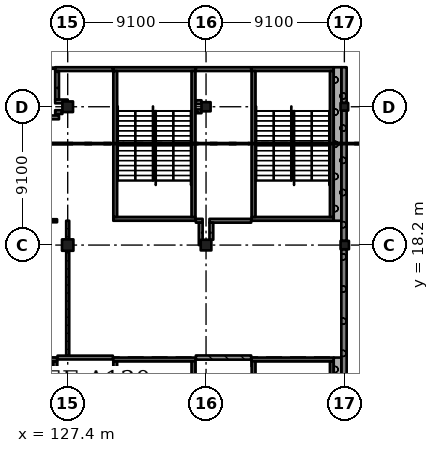
"""IFC4 building model, lengths in metres.
Left out: names, types, materials, properties, quantities, classifications, styles, units other than length and angle.
Written with IfcOpenShell. Run it as: python <this file> out.ifc"""

import sys

from ifc_helpers import new_model, si_unit, direction, frame, frame_2d, origin, origin_2d, place, context, subcontext, project, spatial, rectangle, extrude, element, fill, save


model = new_model("IFC4")
c1 = context("Model", 3, precision=1e-05, world=origin(), true_north=direction((0.0, 1.0)))
c2 = subcontext(c1, "Body", "Model", "MODEL_VIEW")
j1 = project(units=[si_unit("LENGTHUNIT", "METRE"), si_unit("PLANEANGLEUNIT", "RADIAN")], contexts=[c1])
p1 = place(None, origin())
s1 = spatial("IfcSite", under=j1, at=p1, CompositionType="ELEMENT")
p2 = place(p1, origin())
s2 = spatial("IfcBuilding", under=s1, at=p2, CompositionType="ELEMENT")
p3 = place(p2, frame((0.0, 0.0, 10.92)))
s3 = spatial("IfcBuildingStorey", under=s2, at=p3, CompositionType="ELEMENT", Elevation=10.92)
p4 = place(p3, frame((127.4, 18.2, 0.0), z_axis=(0.0, 0.0, 1.0), x_axis=(1.0, 0.0, 0.0)))
e1 = element("IfcColumn", 1, at=p4, inside=s3, PredefinedType="COLUMN", context=c2, shape_type="SweptSolid", body=[
    extrude(rectangle(XDim=0.75, YDim=0.75, at=origin_2d()), origin(), (0.0, 0.0, 1.0), 4.55),
])
for number, where, z_axis, x_axis in (
    (2, (127.4, 27.3, 0.0), (0.0, 0.0, 1.0), (1.0, 0.0, 0.0)),
    (3, (136.5, 18.2, 0.0), (0.0, 0.0, 1.0), (1.0, 0.0, 0.0)),
):
    element("IfcColumn", number, at=place(p3, frame(where, z_axis=z_axis, x_axis=x_axis)), inside=s3, PredefinedType="COLUMN", context=c2, shape_type="SweptSolid", body=[
        extrude(rectangle(XDim=0.7, YDim=0.7, at=origin_2d()), origin(), (0.0, 0.0, 1.0), 4.55),
    ])
p5 = place(p3, frame((136.5, 27.3, 0.0), z_axis=(0.0, 0.0, 1.0), x_axis=(1.0, 0.0, 0.0)))
e4 = element("IfcColumn", 4, at=p5, inside=s3, PredefinedType="COLUMN", context=c2, shape_type="SweptSolid", body=[
    extrude(rectangle(XDim=0.6, YDim=0.6, at=origin_2d()), origin(), (0.0, 0.0, 1.0), 4.55),
])
p6 = place(p3, frame((145.625, 18.2, 0.0), z_axis=(0.0, 0.0, 1.0), x_axis=(1.0, 0.0, 0.0)))
e5 = element("IfcColumn", 5, at=p6, inside=s3, PredefinedType="COLUMN", context=c2, shape_type="SweptSolid", body=[
    extrude(rectangle(XDim=0.55, YDim=0.55, at=origin_2d()), origin(), (0.0, 0.0, 1.0), 4.55),
])
p7 = place(p3, frame((145.6, 27.3, 0.0), z_axis=(0.0, 0.0, 1.0), x_axis=(1.0, 0.0, 0.0)))
e6 = element("IfcColumn", 6, at=p7, inside=s3, PredefinedType="COLUMN", context=c2, shape_type="SweptSolid", body=[
    extrude(rectangle(XDim=0.5, YDim=0.5, at=origin_2d()), origin(), (0.0, 0.0, 1.0), 4.55),
])
p8 = place(p3, frame((144.9, 10.675, 0.0), z_axis=(0.0, 0.0, 1.0), x_axis=(-1.0, 0.0, 0.0)))
e7 = element("IfcWall", 7, at=p8, inside=s3, PredefinedType="SHEAR", context=c2, shape_type="SweptSolid", body=[
    extrude(rectangle(XDim=5.4, YDim=0.25, at=frame_2d((2.7, 0.0))), origin(), (0.0, 0.0, 1.0), 4.55),
])
p9 = place(p8, frame((1.5, 0.0, 0.0)))
e8 = element("IfcOpeningElement", 8, at=p9, cuts=e7, PredefinedType="OPENING", context=c2, shape_type="SweptSolid", body=[
    extrude(rectangle(XDim=2.4, YDim=2.1, at=frame_2d((1.2, 1.05))), frame((0.0, 0.135, 0.0), z_axis=(0.0, -1.0, 0.0), x_axis=(1.0, 0.0, 0.0)), (0.0, 0.0, 1.0), 0.27),
])
for number, where, z_axis, x_axis in (
    (9, (139.625, 10.55, 0.0), (0.0, 0.0, 1.0), (0.0, -1.0, 0.0)),
    (10, (144.775, 10.55, 0.0), (0.0, 0.0, 1.0), (0.0, -1.0, 0.0)),
):
    element("IfcWall", number, at=place(p3, frame(where, z_axis=z_axis, x_axis=x_axis)), inside=s3, PredefinedType="SHEAR", context=c2, shape_type="SweptSolid", body=[
        extrude(rectangle(XDim=9.6, YDim=0.25, at=frame_2d((4.8, 0.0))), origin(), (0.0, 0.0, 1.0), 4.55),
    ])
p10 = place(p3, frame((135.8, 10.675, 0.0), z_axis=(0.0, 0.0, 1.0), x_axis=(-1.0, 0.0, 0.0)))
e11 = element("IfcWall", 11, at=p10, inside=s3, PredefinedType="SHEAR", context=c2, shape_type="SweptSolid", body=[
    extrude(rectangle(XDim=5.4, YDim=0.25, at=frame_2d((2.7, 0.0))), origin(), (0.0, 0.0, 1.0), 4.55),
])
p11 = place(p10, frame((1.5, 0.0, 0.0)))
e12 = element("IfcOpeningElement", 12, at=p11, cuts=e11, PredefinedType="OPENING", context=c2, shape_type="SweptSolid", body=[
    extrude(rectangle(XDim=2.4, YDim=2.1, at=frame_2d((1.2, 1.05))), frame((0.0, 0.135, 0.0), z_axis=(0.0, -1.0, 0.0), x_axis=(1.0, 0.0, 0.0)), (0.0, 0.0, 1.0), 0.27),
])
for number, where, z_axis, x_axis in (
    (13, (130.525, 10.55, 0.0), (0.0, 0.0, 1.0), (0.0, -1.0, 0.0)),
    (14, (135.675, 10.55, 0.0), (0.0, 0.0, 1.0), (0.0, -1.0, 0.0)),
):
    element("IfcWall", number, at=place(p3, frame(where, z_axis=z_axis, x_axis=x_axis)), inside=s3, PredefinedType="SHEAR", context=c2, shape_type="SweptSolid", body=[
        extrude(rectangle(XDim=9.6, YDim=0.25, at=frame_2d((4.8, 0.0))), origin(), (0.0, 0.0, 1.0), 4.55),
    ])
p12 = place(p3, frame((126.7, 10.675, 0.0), z_axis=(0.0, 0.0, 1.0), x_axis=(-1.0, 0.0, 0.0)))
e15 = element("IfcWall", 15, at=p12, inside=s3, PredefinedType="SHEAR", context=c2, shape_type="SweptSolid", body=[
    extrude(rectangle(XDim=5.4, YDim=0.25, at=frame_2d((2.7, 0.0))), origin(), (0.0, 0.0, 1.0), 4.55),
])
p13 = place(p12, frame((1.5, 0.0, 0.0)))
e16 = element("IfcOpeningElement", 16, at=p13, cuts=e15, PredefinedType="OPENING", context=c2, shape_type="SweptSolid", body=[
    extrude(rectangle(XDim=2.4, YDim=2.1, at=frame_2d((1.2, 1.05))), frame((0.0, 0.135, 0.0), z_axis=(0.0, -1.0, 0.0), x_axis=(1.0, 0.0, 0.0)), (0.0, 0.0, 1.0), 0.27),
])
p14 = place(p3, frame((126.575, 10.55, 0.0), z_axis=(0.0, 0.0, 1.0), x_axis=(0.0, -1.0, 0.0)))
e17 = element("IfcWall", 17, at=p14, inside=s3, PredefinedType="SHEAR", context=c2, shape_type="SweptSolid", body=[
    extrude(rectangle(XDim=9.6, YDim=0.25, at=frame_2d((4.8, 0.0))), origin(), (0.0, 0.0, 1.0), 4.55),
])
p15 = place(p3, frame((144.9, 19.925, 0.0), z_axis=(0.0, 0.0, 1.0), x_axis=(-1.0, 0.0, 0.0)))
e18 = element("IfcWall", 18, at=p15, inside=s3, PredefinedType="SHEAR", context=c2, shape_type="SweptSolid", body=[
    extrude(rectangle(XDim=5.4, YDim=0.25, at=frame_2d((2.7, 0.0))), origin(), (0.0, 0.0, 1.0), 4.55),
])
p16 = place(p15, frame((1.5, 0.0, 0.0)))
e19 = element("IfcOpeningElement", 19, at=p16, cuts=e18, PredefinedType="OPENING", context=c2, shape_type="SweptSolid", body=[
    extrude(rectangle(XDim=2.4, YDim=2.1, at=frame_2d((1.2, 1.05))), frame((0.0, 0.135, 0.0), z_axis=(0.0, -1.0, 0.0), x_axis=(1.0, 0.0, 0.0)), (0.0, 0.0, 1.0), 0.27),
])
p17 = place(p3, frame((144.9, 29.775, 0.0), z_axis=(0.0, 0.0, 1.0), x_axis=(-1.0, 0.0, 0.0)))
e20 = element("IfcWall", 20, at=p17, inside=s3, PredefinedType="SHEAR", context=c2, shape_type="SweptSolid", body=[
    extrude(rectangle(XDim=5.4, YDim=0.25, at=frame_2d((2.7, 0.0))), origin(), (0.0, 0.0, 1.0), 4.55),
])
for number, where, z_axis, x_axis in (
    (21, (139.625, 29.65, 0.0), (0.0, 0.0, 1.0), (0.0, -1.0, 0.0)),
    (22, (144.775, 29.65, 0.0), (0.0, 0.0, 1.0), (0.0, -1.0, 0.0)),
):
    element("IfcWall", number, at=place(p3, frame(where, z_axis=z_axis, x_axis=x_axis)), inside=s3, PredefinedType="SHEAR", context=c2, shape_type="SweptSolid", body=[
        extrude(rectangle(XDim=9.6, YDim=0.25, at=frame_2d((4.8, 0.0))), origin(), (0.0, 0.0, 1.0), 4.55),
    ])
p18 = place(p3, frame((135.8, 19.925, 0.0), z_axis=(0.0, 0.0, 1.0), x_axis=(-1.0, 0.0, 0.0)))
e23 = element("IfcWall", 23, at=p18, inside=s3, PredefinedType="SHEAR", context=c2, shape_type="SweptSolid", body=[
    extrude(rectangle(XDim=5.4, YDim=0.25, at=frame_2d((2.7, 0.0))), origin(), (0.0, 0.0, 1.0), 4.55),
])
p19 = place(p18, frame((1.5, 0.0, 0.0)))
e24 = element("IfcOpeningElement", 24, at=p19, cuts=e23, PredefinedType="OPENING", context=c2, shape_type="SweptSolid", body=[
    extrude(rectangle(XDim=2.4, YDim=2.1, at=frame_2d((1.2, 1.05))), frame((0.0, 0.135, 0.0), z_axis=(0.0, -1.0, 0.0), x_axis=(1.0, 0.0, 0.0)), (0.0, 0.0, 1.0), 0.27),
])
p20 = place(p3, frame((135.8, 29.775, 0.0), z_axis=(0.0, 0.0, 1.0), x_axis=(-1.0, 0.0, 0.0)))
e25 = element("IfcWall", 25, at=p20, inside=s3, PredefinedType="SHEAR", context=c2, shape_type="SweptSolid", body=[
    extrude(rectangle(XDim=5.4, YDim=0.25, at=frame_2d((2.7, 0.0))), origin(), (0.0, 0.0, 1.0), 4.55),
])
for number, where, z_axis, x_axis in (
    (26, (130.525, 29.65, 0.0), (0.0, 0.0, 1.0), (0.0, -1.0, 0.0)),
    (27, (135.675, 29.65, 0.0), (0.0, 0.0, 1.0), (0.0, -1.0, 0.0)),
):
    element("IfcWall", number, at=place(p3, frame(where, z_axis=z_axis, x_axis=x_axis)), inside=s3, PredefinedType="SHEAR", context=c2, shape_type="SweptSolid", body=[
        extrude(rectangle(XDim=9.6, YDim=0.25, at=frame_2d((4.8, 0.0))), origin(), (0.0, 0.0, 1.0), 4.55),
    ])
for number, where, z_axis, x_axis in (
    (28, (145.575, 9.35, 0.0), (0.0, 0.0, 1.0), (0.0, 1.0, 0.0)),
    (29, (145.575, 18.475, 0.0), (0.0, 0.0, 1.0), (0.0, 1.0, 0.0)),
):
    element("IfcWall", number, at=place(p3, frame(where, z_axis=z_axis, x_axis=x_axis)), inside=s3, PredefinedType="SOLIDWALL", context=c2, shape_type="SweptSolid", body=[
        extrude(rectangle(XDim=8.575, YDim=0.35, at=frame_2d((4.288, 0.0))), origin(), (0.0, 0.0, 1.0), 3.5),
    ])
p21 = place(p3, frame((145.575, 27.55, 0.0), z_axis=(0.0, 0.0, 1.0), x_axis=(0.0, 1.0, 0.0)))
e30 = element("IfcWall", 30, at=p21, inside=s3, PredefinedType="SOLIDWALL", context=c2, shape_type="SweptSolid", body=[
    extrude(rectangle(XDim=2.35, YDim=0.35, at=frame_2d((1.175, 0.0))), origin(), (0.0, 0.0, 1.0), 3.5),
])
p22 = place(p3, frame((145.15, 0.7, 0.0), z_axis=(0.0, 0.0, 1.0), x_axis=(0.0, 1.0, 0.0)))
e31 = element("IfcWall", 31, at=p22, inside=s3, PredefinedType="SOLIDWALL", context=c2, shape_type="SweptSolid", body=[
    extrude(rectangle(XDim=10.1, YDim=0.5, at=frame_2d((5.05, 0.0))), origin(), (0.0, 0.0, 1.0), 4.55),
])
p23 = place(p3, frame((145.15, 19.8, 0.0), z_axis=(0.0, 0.0, 1.0), x_axis=(0.0, 1.0, 0.0)))
e32 = element("IfcWall", 32, at=p23, inside=s3, PredefinedType="SOLIDWALL", context=c2, shape_type="SweptSolid", body=[
    extrude(rectangle(XDim=10.1, YDim=0.5, at=frame_2d((5.05, 0.0))), origin(), (0.0, 0.0, 1.0), 4.55),
])
p24 = place(p3, frame((121.3, 19.8, 0.0), z_axis=(0.0, 0.0, 1.0), x_axis=(1.0, 0.0, 0.0)))
e33 = element("IfcWall", 33, at=p24, inside=s3, PredefinedType="PARTITIONING", context=c2, shape_type="SweptSolid", body=[
    extrude(rectangle(XDim=5.4, YDim=0.2, at=frame_2d((2.7, 0.0))), origin(), (0.0, 0.0, 1.0), 4.25),
])
p25 = place(p24, frame((1.85, 0.0, 0.0)))
e34 = element("IfcOpeningElement", 34, at=p25, cuts=e33, PredefinedType="OPENING", context=c2, shape_type="SweptSolid", body=[
    extrude(rectangle(XDim=1.8, YDim=2.4, at=frame_2d((0.9, 1.2))), frame((0.0, 0.11, 0.0), z_axis=(0.0, -1.0, 0.0), x_axis=(1.0, 0.0, 0.0)), (0.0, 0.0, 1.0), 0.22),
])
p26 = place(p3, frame((126.575, 26.95, 0.0), z_axis=(0.0, 0.0, 1.0), x_axis=(1.0, 0.0, 0.0)))
e35 = element("IfcWall", 35, at=p26, inside=s3, PredefinedType="SOLIDWALL", context=c2, shape_type="SweptSolid", body=[
    extrude(rectangle(XDim=0.475, YDim=0.25, at=frame_2d((0.238, 0.0))), origin(), (0.0, 0.0, 1.0), 4.25),
])
p27 = place(p3, frame((126.575, 27.65, 0.0), z_axis=(0.0, 0.0, 1.0), x_axis=(1.0, 0.0, 0.0)))
e36 = element("IfcWall", 36, at=p27, inside=s3, PredefinedType="SOLIDWALL", context=c2, shape_type="SweptSolid", body=[
    extrude(rectangle(XDim=0.825, YDim=0.25, at=frame_2d((0.413, 0.0))), origin(), (0.0, 0.0, 1.0), 4.25),
])
p28 = place(p3, frame((126.575, 29.775, 0.0), z_axis=(0.0, 0.0, 1.0), x_axis=(1.0, 0.0, 0.0)))
e37 = element("IfcWall", 37, at=p28, inside=s3, PredefinedType="SOLIDWALL", context=c2, shape_type="SweptSolid", body=[
    extrude(rectangle(XDim=3.795, YDim=0.25, at=frame_2d((1.897, 0.0))), origin(), (0.0, 0.0, 1.0), 4.25),
])
p29 = place(p3, frame((126.7, 27.775, 0.0), z_axis=(0.0, 0.0, 1.0), x_axis=(0.0, 1.0, 0.0)))
e38 = element("IfcWall", 38, at=p29, inside=s3, PredefinedType="SOLIDWALL", context=c2, shape_type="SweptSolid", body=[
    extrude(rectangle(XDim=1.875, YDim=0.25, at=frame_2d((0.938, 0.0))), origin(), (0.0, 0.0, 1.0), 4.25),
])
p30 = place(p3, frame((126.825, 26.6, 0.0), z_axis=(0.0, 0.0, 1.0), x_axis=(-1.0, 0.0, 0.0)))
e39 = element("IfcWall", 39, at=p30, inside=s3, PredefinedType="SOLIDWALL", context=c2, shape_type="SweptSolid", body=[
    extrude(rectangle(XDim=0.695, YDim=0.25, at=frame_2d((0.348, 0.0))), origin(), (0.0, 0.0, 1.0), 4.25),
])
p31 = place(p3, frame((126.73, 10.8, 0.0), z_axis=(0.0, 0.0, 1.0), x_axis=(1.0, 0.0, 0.0)))
e40 = element("IfcWall", 40, at=p31, inside=s3, PredefinedType="SOLIDWALL", context=c2, shape_type="SweptSolid", body=[
    extrude(rectangle(XDim=3.64, YDim=0.25, at=frame_2d((1.82, 0.0))), origin(), (0.0, 0.0, 1.0), 4.25),
])
p32 = place(p31, frame((1.69, 0.0, 0.0)))
e41 = element("IfcOpeningElement", 41, at=p32, cuts=e40, PredefinedType="OPENING", context=c2, shape_type="SweptSolid", body=[
    extrude(rectangle(XDim=1.0, YDim=2.1, at=frame_2d((0.5, 1.05))), frame((0.0, 0.135, 0.0), z_axis=(0.0, -1.0, 0.0), x_axis=(1.0, 0.0, 0.0)), (0.0, 0.0, 1.0), 0.27),
])
p33 = place(p3, frame((127.4, 10.925, 0.0), z_axis=(0.0, 0.0, 1.0), x_axis=(0.0, 1.0, 0.0)))
e42 = element("IfcWall", 42, at=p33, inside=s3, PredefinedType="PARTITIONING", context=c2, shape_type="SweptSolid", body=[
    extrude(rectangle(XDim=6.9, YDim=0.2, at=frame_2d((3.45, 0.0))), origin(), (0.0, 0.0, 1.0), 3.55),
])
p34 = place(p33, frame((0.85, 0.0, 0.0)))
e43 = element("IfcOpeningElement", 43, at=p34, cuts=e42, PredefinedType="OPENING", context=c2, shape_type="SweptSolid", body=[
    extrude(rectangle(XDim=1.8, YDim=2.4, at=frame_2d((0.9, 1.2))), frame((0.0, 0.11, 0.0), z_axis=(0.0, -1.0, 0.0), x_axis=(1.0, 0.0, 0.0)), (0.0, 0.0, 1.0), 0.22),
])
p35 = place(p33, frame((4.25, 0.0, 0.0)))
e44 = element("IfcOpeningElement", 44, at=p35, cuts=e42, PredefinedType="OPENING", context=c2, shape_type="SweptSolid", body=[
    extrude(rectangle(XDim=1.8, YDim=2.4, at=frame_2d((0.9, 1.2))), frame((0.0, 0.11, 0.0), z_axis=(0.0, -1.0, 0.0), x_axis=(1.0, 0.0, 0.0)), (0.0, 0.0, 1.0), 0.22),
])
p36 = place(p3, frame((127.4, 18.575, 0.0), z_axis=(0.0, 0.0, 1.0), x_axis=(0.0, 1.0, 0.0)))
e45 = element("IfcWall", 45, at=p36, inside=s3, PredefinedType="PARTITIONING", context=c2, shape_type="SweptSolid", body=[
    extrude(rectangle(XDim=1.225, YDim=0.2, at=frame_2d((0.613, 0.0))), origin(), (0.0, 0.0, 1.0), 3.55),
])
p37 = place(p3, frame((135.83, 19.8, 0.0), z_axis=(0.0, 0.0, 1.0), x_axis=(1.0, 0.0, 0.0)))
e46 = element("IfcWall", 46, at=p37, inside=s3, PredefinedType="SOLIDWALL", context=c2, shape_type="SweptSolid", body=[
    extrude(rectangle(XDim=0.445, YDim=0.25, at=frame_2d((0.222, 0.0))), origin(), (0.0, 0.0, 1.0), 4.25),
])
p38 = place(p3, frame((135.83, 27.0, 0.0), z_axis=(0.0, 0.0, 1.0), x_axis=(1.0, 0.0, 0.0)))
e47 = element("IfcWall", 47, at=p38, inside=s3, PredefinedType="SOLIDWALL", context=c2, shape_type="SweptSolid", body=[
    extrude(rectangle(XDim=0.37, YDim=0.25, at=frame_2d((0.185, 0.0))), origin(), (0.0, 0.0, 1.0), 4.25),
])
p39 = place(p3, frame((135.83, 29.775, 0.0), z_axis=(0.0, 0.0, 1.0), x_axis=(1.0, 0.0, 0.0)))
e48 = element("IfcWall", 48, at=p39, inside=s3, PredefinedType="SOLIDWALL", context=c2, shape_type="SweptSolid", body=[
    extrude(rectangle(XDim=3.64, YDim=0.25, at=frame_2d((1.82, 0.0))), origin(), (0.0, 0.0, 1.0), 4.25),
])
p40 = place(p3, frame((136.15, 18.2, 0.0), z_axis=(0.0, 0.0, 1.0), x_axis=(0.0, 1.0, 0.0)))
e49 = element("IfcWall", 49, at=p40, inside=s3, PredefinedType="SOLIDWALL", context=c2, shape_type="SweptSolid", body=[
    extrude(rectangle(XDim=1.475, YDim=0.25, at=frame_2d((0.738, 0.0))), origin(), (0.0, 0.0, 1.0), 4.25),
])
p41 = place(p3, frame((136.2, 27.6, 0.0), z_axis=(0.0, 0.0, 1.0), x_axis=(-1.0, 0.0, 0.0)))
e50 = element("IfcWall", 50, at=p41, inside=s3, PredefinedType="SOLIDWALL", context=c2, shape_type="SweptSolid", body=[
    extrude(rectangle(XDim=0.37, YDim=0.25, at=frame_2d((0.185, 0.0))), origin(), (0.0, 0.0, 1.0), 4.25),
])
p42 = place(p3, frame((136.725, 19.8, 0.0), z_axis=(0.0, 0.0, 1.0), x_axis=(1.0, 0.0, 0.0)))
e51 = element("IfcWall", 51, at=p42, inside=s3, PredefinedType="SOLIDWALL", context=c2, shape_type="SweptSolid", body=[
    extrude(rectangle(XDim=2.745, YDim=0.25, at=frame_2d((1.373, 0.0))), origin(), (0.0, 0.0, 1.0), 4.25),
])
p43 = place(p42, frame((0.85, 0.0, 0.0)))
e52 = element("IfcOpeningElement", 52, at=p43, cuts=e51, PredefinedType="OPENING", context=c2, shape_type="SweptSolid", body=[
    extrude(rectangle(XDim=1.0, YDim=2.1, at=frame_2d((0.5, 1.05))), frame((0.0, 0.135, 0.0), z_axis=(0.0, -1.0, 0.0), x_axis=(1.0, 0.0, 0.0)), (0.0, 0.0, 1.0), 0.27),
])
p44 = place(p3, frame((136.85, 18.55, 0.0), z_axis=(0.0, 0.0, 1.0), x_axis=(0.0, 1.0, 0.0)))
e53 = element("IfcWall", 53, at=p44, inside=s3, PredefinedType="SOLIDWALL", context=c2, shape_type="SweptSolid", body=[
    extrude(rectangle(XDim=1.125, YDim=0.25, at=frame_2d((0.562, 0.0))), origin(), (0.0, 0.0, 1.0), 4.25),
])
p45 = place(p3, frame((139.47, 10.8, 0.0), z_axis=(0.0, 0.0, 1.0), x_axis=(-1.0, 0.0, 0.0)))
e54 = element("IfcWall", 54, at=p45, inside=s3, PredefinedType="SOLIDWALL", context=c2, shape_type="SweptSolid", body=[
    extrude(rectangle(XDim=3.64, YDim=0.275, at=frame_2d((1.82, 0.0))), origin(), (0.0, 0.0, 1.0), 4.25),
])
p46 = place(p45, frame((1.25, 0.0, 0.0)))
e55 = element("IfcOpeningElement", 55, at=p46, cuts=e54, PredefinedType="OPENING", context=c2, shape_type="SweptSolid", body=[
    extrude(rectangle(XDim=1.2, YDim=2.4, at=frame_2d((0.6, 1.2))), frame((0.0, 0.147, 0.0), z_axis=(0.0, -1.0, 0.0), x_axis=(1.0, 0.0, 0.0)), (0.0, 0.0, 1.0), 0.295),
])
p47 = place(p43, origin())
e56 = element("IfcDoor", 56, at=p47, inside=s3, OperationType="SINGLE_SWING_RIGHT", PredefinedType="DOOR", context=c2, shape_type="SweptSolid", body=[
    extrude(rectangle(XDim=1.0, YDim=2.1, at=frame_2d((0.5, 1.05))), frame((0.0, 0.025, 0.0), z_axis=(0.0, -1.0, 0.0), x_axis=(1.0, 0.0, 0.0)), (0.0, 0.0, 1.0), 0.05),
])
fill(e52, e56)
p48 = place(p46, origin())
e57 = element("IfcDoor", 57, at=p48, inside=s3, OperationType="SINGLE_SWING_LEFT", PredefinedType="DOOR", context=c2, shape_type="SweptSolid", body=[
    extrude(rectangle(XDim=1.2, YDim=2.4, at=frame_2d((0.6, 1.2))), frame((0.0, 0.025, 0.0), z_axis=(0.0, -1.0, 0.0), x_axis=(1.0, 0.0, 0.0)), (0.0, 0.0, 1.0), 0.05),
])
fill(e55, e57)
p49 = place(p32, origin())
e58 = element("IfcDoor", 58, at=p49, inside=s3, OperationType="SINGLE_SWING_RIGHT", PredefinedType="DOOR", context=c2, shape_type="SweptSolid", body=[
    extrude(rectangle(XDim=1.0, YDim=2.1, at=frame_2d((0.5, 1.05))), frame((0.0, 0.025, 0.0), z_axis=(0.0, -1.0, 0.0), x_axis=(1.0, 0.0, 0.0)), (0.0, 0.0, 1.0), 0.05),
])
fill(e41, e58)
p50 = place(p34, origin())
e59 = element("IfcDoor", 59, at=p50, inside=s3, OperationType="DOUBLE_DOOR_SINGLE_SWING", PredefinedType="DOOR", context=c2, shape_type="SweptSolid", body=[
    extrude(rectangle(XDim=1.8, YDim=2.4, at=frame_2d((0.9, 1.2))), frame((0.0, 0.025, 0.0), z_axis=(0.0, -1.0, 0.0), x_axis=(1.0, 0.0, 0.0)), (0.0, 0.0, 1.0), 0.05),
])
fill(e43, e59)
p51 = place(p35, origin())
e60 = element("IfcDoor", 60, at=p51, inside=s3, OperationType="DOUBLE_DOOR_SINGLE_SWING", PredefinedType="DOOR", context=c2, shape_type="SweptSolid", body=[
    extrude(rectangle(XDim=1.8, YDim=2.4, at=frame_2d((0.9, 1.2))), frame((0.0, 0.025, 0.0), z_axis=(0.0, -1.0, 0.0), x_axis=(1.0, 0.0, 0.0)), (0.0, 0.0, 1.0), 0.05),
])
fill(e44, e60)
p52 = place(p9, origin())
e61 = element("IfcDoor", 61, at=p52, inside=s3, OperationType="DOUBLE_DOOR_SINGLE_SWING", PredefinedType="DOOR", context=c2, shape_type="SweptSolid", body=[
    extrude(rectangle(XDim=2.4, YDim=2.1, at=frame_2d((1.2, 1.05))), frame((0.0, 0.025, 0.0), z_axis=(0.0, -1.0, 0.0), x_axis=(1.0, 0.0, 0.0)), (0.0, 0.0, 1.0), 0.05),
])
fill(e8, e61)
p53 = place(p11, origin())
e62 = element("IfcDoor", 62, at=p53, inside=s3, OperationType="DOUBLE_DOOR_SINGLE_SWING", PredefinedType="DOOR", context=c2, shape_type="SweptSolid", body=[
    extrude(rectangle(XDim=2.4, YDim=2.1, at=frame_2d((1.2, 1.05))), frame((0.0, 0.025, 0.0), z_axis=(0.0, -1.0, 0.0), x_axis=(1.0, 0.0, 0.0)), (0.0, 0.0, 1.0), 0.05),
])
fill(e12, e62)
p54 = place(p16, origin())
e63 = element("IfcDoor", 63, at=p54, inside=s3, OperationType="DOUBLE_DOOR_SINGLE_SWING", PredefinedType="DOOR", context=c2, shape_type="SweptSolid", body=[
    extrude(rectangle(XDim=2.4, YDim=2.1, at=frame_2d((1.2, 1.05))), frame((0.0, 0.025, 0.0), z_axis=(0.0, -1.0, 0.0), x_axis=(1.0, 0.0, 0.0)), (0.0, 0.0, 1.0), 0.05),
])
fill(e19, e63)
p55 = place(p19, origin())
e64 = element("IfcDoor", 64, at=p55, inside=s3, OperationType="DOUBLE_DOOR_SINGLE_SWING", PredefinedType="DOOR", context=c2, shape_type="SweptSolid", body=[
    extrude(rectangle(XDim=2.4, YDim=2.1, at=frame_2d((1.2, 1.05))), frame((0.0, 0.025, 0.0), z_axis=(0.0, -1.0, 0.0), x_axis=(1.0, 0.0, 0.0)), (0.0, 0.0, 1.0), 0.05),
])
fill(e24, e64)
save(model, sys.argv[1])
